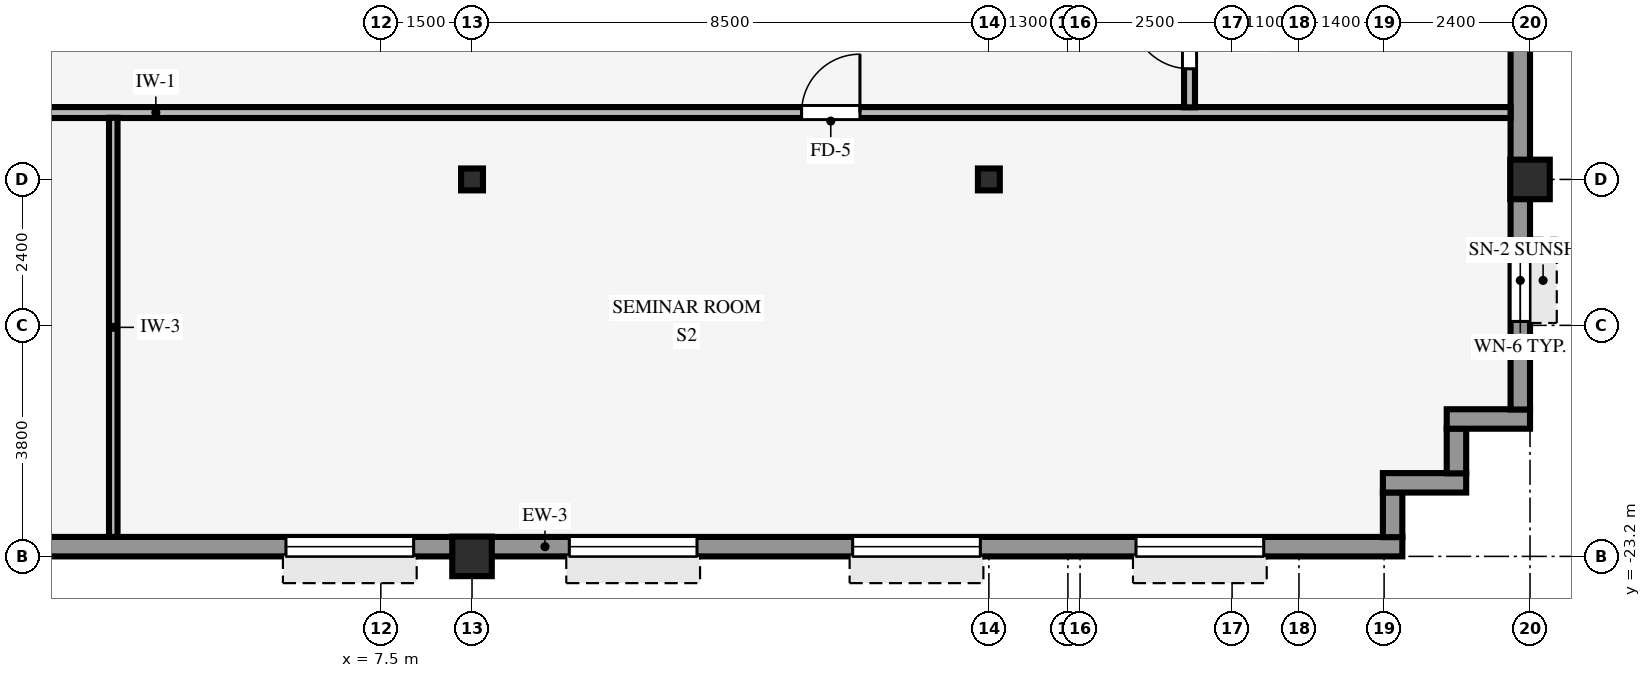
"""IFC4 building model, lengths in metres.
Left out: names, types, materials, properties, quantities, classifications, styles, units other than length and angle.
Written with IfcOpenShell. Run it as: python <this file> out.ifc"""

import sys

from ifc_helpers import new_model, si_unit, direction, frame, frame_2d, origin, origin_2d, place, context, subcontext, project, spatial, rectangle, hollow_rectangle, i_section, extrude, source, transform, mapped, element, fill, save


model = new_model("IFC4")
c1 = context("Model", 3, precision=1e-05, world=origin(), true_north=direction((0.0, 1.0)))
c2 = subcontext(c1, "Body", "Model", "MODEL_VIEW")
j1 = project(units=[si_unit("LENGTHUNIT", "METRE"), si_unit("PLANEANGLEUNIT", "RADIAN")], contexts=[c1])
p1 = place(None, origin())
s1 = spatial("IfcSite", under=j1, at=p1, CompositionType="ELEMENT")
p2 = place(p1, origin())
s2 = spatial("IfcBuilding", under=s1, at=p2, CompositionType="ELEMENT")
p3 = place(p2, frame((0.0, 0.0, 142.1)))
s3 = spatial("IfcBuildingStorey", under=s2, at=p3, CompositionType="ELEMENT", Elevation=142.1)
for number, where, z_axis, x_axis in (
    (1, (26.4, -17.0, 0.0), (0.0, 0.0, 1.0), (1.0, 0.0, 0.0)),
    (2, (9.0, -23.2, 0.0), (0.0, 0.0, 1.0), (1.0, 0.0, 0.0)),
):
    element("IfcColumn", number, at=place(p3, frame(where, z_axis=z_axis, x_axis=x_axis)), inside=s3, PredefinedType="COLUMN", context=c2, shape_type="SweptSolid", body=[
        extrude(hollow_rectangle(XDim=0.65, YDim=0.65, WallThickness=0.04, InnerFilletRadius=0.04, OuterFilletRadius=0.08, at=origin_2d()), origin(), (0.0, 0.0, 1.0), 3.37),
    ])
for number, where, z_axis, x_axis in (
    (3, (9.0, -17.0, 0.0), (0.0, 0.0, 1.0), (1.0, 0.0, 0.0)),
    (4, (17.5, -17.0, 0.0), (0.0, 0.0, 1.0), (1.0, 0.0, 0.0)),
):
    element("IfcColumn", number, at=place(p3, frame(where, z_axis=z_axis, x_axis=x_axis)), inside=s3, PredefinedType="COLUMN", context=c2, shape_type="SweptSolid", body=[
        extrude(i_section(OverallWidth=0.36, OverallDepth=0.36, WebThickness=0.021, FlangeThickness=0.021, FilletRadius=0.018, at=origin_2d()), origin(), (0.0, 0.0, 1.0), 3.37),
    ])
p4 = place(p3, frame((-24.3, -23.04, 0.0), z_axis=(0.0, 0.0, 1.0), x_axis=(1.0, 0.0, 0.0)))
e5 = element("IfcWall", 5, at=p4, inside=s3, PredefinedType="STANDARD", context=c2, shape_type="SweptSolid", body=[
    extrude(rectangle(XDim=48.6, YDim=0.32, at=frame_2d((24.3, 0.0))), origin(), (0.0, 0.0, 1.0), 2.705),
])
p5 = place(p4, frame((19.98, 0.0, 0.0), z_axis=(0.0, 0.0, 1.0), x_axis=(-1.0, 0.0, 0.0)))
e6 = element("IfcOpeningElement", 6, at=p5, cuts=e5, PredefinedType="OPENING", context=c2, shape_type="SweptSolid", body=[
    extrude(rectangle(XDim=0.98, YDim=2.15, at=frame_2d((0.49, 1.075))), frame((0.0, 0.17, 0.0), z_axis=(0.0, -1.0, 0.0), x_axis=(1.0, 0.0, 0.0)), (0.0, 0.0, 1.0), 0.34),
])
p6 = place(p4, frame((2.28, 0.0, 0.8)))
e7 = element("IfcOpeningElement", 7, at=p6, cuts=e5, PredefinedType="OPENING", context=c2, shape_type="SweptSolid", body=[
    extrude(rectangle(XDim=2.1, YDim=1.56, at=frame_2d((1.05, 0.78))), frame((0.0, 0.17, 0.0), z_axis=(0.0, -1.0, 0.0), x_axis=(1.0, 0.0, 0.0)), (0.0, 0.0, 1.0), 0.34),
])
p7 = place(p4, frame((6.94, 0.0, 0.8)))
e8 = element("IfcOpeningElement", 8, at=p7, cuts=e5, PredefinedType="OPENING", context=c2, shape_type="SweptSolid", body=[
    extrude(rectangle(XDim=2.1, YDim=1.56, at=frame_2d((1.05, 0.78))), frame((0.0, 0.17, 0.0), z_axis=(0.0, -1.0, 0.0), x_axis=(1.0, 0.0, 0.0)), (0.0, 0.0, 1.0), 0.34),
])
p8 = place(p4, frame((11.6, 0.0, 0.8)))
e9 = element("IfcOpeningElement", 9, at=p8, cuts=e5, PredefinedType="OPENING", context=c2, shape_type="SweptSolid", body=[
    extrude(rectangle(XDim=2.1, YDim=1.56, at=frame_2d((1.05, 0.78))), frame((0.0, 0.17, 0.0), z_axis=(0.0, -1.0, 0.0), x_axis=(1.0, 0.0, 0.0)), (0.0, 0.0, 1.0), 0.34),
])
p9 = place(p4, frame((16.26, 0.0, 0.8)))
e10 = element("IfcOpeningElement", 10, at=p9, cuts=e5, PredefinedType="OPENING", context=c2, shape_type="SweptSolid", body=[
    extrude(rectangle(XDim=2.1, YDim=1.56, at=frame_2d((1.05, 0.78))), frame((0.0, 0.17, 0.0), z_axis=(0.0, -1.0, 0.0), x_axis=(1.0, 0.0, 0.0)), (0.0, 0.0, 1.0), 0.34),
])
p10 = place(p4, frame((20.92, 0.0, 0.8)))
e11 = element("IfcOpeningElement", 11, at=p10, cuts=e5, PredefinedType="OPENING", context=c2, shape_type="SweptSolid", body=[
    extrude(rectangle(XDim=2.1, YDim=1.56, at=frame_2d((1.05, 0.78))), frame((0.0, 0.17, 0.0), z_axis=(0.0, -1.0, 0.0), x_axis=(1.0, 0.0, 0.0)), (0.0, 0.0, 1.0), 0.34),
])
p11 = place(p4, frame((30.24, 0.0, 0.8)))
e12 = element("IfcOpeningElement", 12, at=p11, cuts=e5, PredefinedType="OPENING", context=c2, shape_type="SweptSolid", body=[
    extrude(rectangle(XDim=2.1, YDim=1.56, at=frame_2d((1.05, 0.78))), frame((0.0, 0.17, 0.0), z_axis=(0.0, -1.0, 0.0), x_axis=(1.0, 0.0, 0.0)), (0.0, 0.0, 1.0), 0.34),
])
p12 = place(p4, frame((34.9, 0.0, 0.8)))
e13 = element("IfcOpeningElement", 13, at=p12, cuts=e5, PredefinedType="OPENING", context=c2, shape_type="SweptSolid", body=[
    extrude(rectangle(XDim=2.1, YDim=1.56, at=frame_2d((1.05, 0.78))), frame((0.0, 0.17, 0.0), z_axis=(0.0, -1.0, 0.0), x_axis=(1.0, 0.0, 0.0)), (0.0, 0.0, 1.0), 0.34),
])
p13 = place(p4, frame((39.56, 0.0, 0.8)))
e14 = element("IfcOpeningElement", 14, at=p13, cuts=e5, PredefinedType="OPENING", context=c2, shape_type="SweptSolid", body=[
    extrude(rectangle(XDim=2.1, YDim=1.56, at=frame_2d((1.05, 0.78))), frame((0.0, 0.17, 0.0), z_axis=(0.0, -1.0, 0.0), x_axis=(1.0, 0.0, 0.0)), (0.0, 0.0, 1.0), 0.34),
])
p14 = place(p4, frame((44.22, 0.0, 0.8)))
e15 = element("IfcOpeningElement", 15, at=p14, cuts=e5, PredefinedType="OPENING", context=c2, shape_type="SweptSolid", body=[
    extrude(rectangle(XDim=2.1, YDim=1.56, at=frame_2d((1.05, 0.78))), frame((0.0, 0.17, 0.0), z_axis=(0.0, -1.0, 0.0), x_axis=(1.0, 0.0, 0.0)), (0.0, 0.0, 1.0), 0.34),
])
p15 = place(p3, frame((24.14, -22.884, 0.0), z_axis=(0.0, 0.0, 1.0), x_axis=(0.0, 1.0, 0.0)))
e16 = element("IfcWall", 16, at=p15, inside=s3, PredefinedType="STANDARD", context=c2, shape_type="SweptSolid", body=[
    extrude(rectangle(XDim=0.738, YDim=0.32, at=frame_2d((0.369, 0.0))), origin(), (0.0, 0.0, 1.0), 3.36),
])
p16 = place(p3, frame((23.98, -21.99, 0.0), z_axis=(0.0, 0.0, 1.0), x_axis=(1.0, 0.0, 0.0)))
e17 = element("IfcWall", 17, at=p16, inside=s3, PredefinedType="STANDARD", context=c2, shape_type="SweptSolid", body=[
    extrude(rectangle(XDim=1.37, YDim=0.32, at=frame_2d((0.685, 0.0))), origin(), (0.0, 0.0, 1.0), 3.36),
])
p17 = place(p3, frame((25.19, -21.834, 0.0), z_axis=(0.0, 0.0, 1.0), x_axis=(0.0, 1.0, 0.0)))
e18 = element("IfcWall", 18, at=p17, inside=s3, PredefinedType="STANDARD", context=c2, shape_type="SweptSolid", body=[
    extrude(rectangle(XDim=0.738, YDim=0.32, at=frame_2d((0.369, 0.0))), origin(), (0.0, 0.0, 1.0), 3.36),
])
p18 = place(p3, frame((25.03, -20.94, 0.0), z_axis=(0.0, 0.0, 1.0), x_axis=(1.0, 0.0, 0.0)))
e19 = element("IfcWall", 19, at=p18, inside=s3, PredefinedType="STANDARD", context=c2, shape_type="SweptSolid", body=[
    extrude(rectangle(XDim=1.37, YDim=0.32, at=frame_2d((0.685, 0.0))), origin(), (0.0, 0.0, 1.0), 3.36),
])
p19 = place(p3, frame((26.24, -20.784, 0.0), z_axis=(0.0, 0.0, 1.0), x_axis=(0.0, 1.0, 0.0)))
e20 = element("IfcWall", 20, at=p19, inside=s3, PredefinedType="STANDARD", context=c2, shape_type="SweptSolid", body=[
    extrude(rectangle(XDim=41.568, YDim=0.32, at=frame_2d((20.784, 0.0))), origin(), (0.0, 0.0, 1.0), 2.705),
])
p20 = place(p19, frame((1.448, 0.0, 0.8)))
e21 = element("IfcOpeningElement", 21, at=p20, cuts=e20, PredefinedType="OPENING", context=c2, shape_type="SweptSolid", body=[
    extrude(rectangle(XDim=1.35, YDim=1.56, at=frame_2d((0.675, 0.78))), frame((0.0, 0.17, 0.0), z_axis=(0.0, -1.0, 0.0), x_axis=(1.0, 0.0, 0.0)), (0.0, 0.0, 1.0), 0.34),
])
p21 = place(p19, frame((7.744, 0.0, 0.8)))
e22 = element("IfcOpeningElement", 22, at=p21, cuts=e20, PredefinedType="OPENING", context=c2, shape_type="SweptSolid", body=[
    extrude(rectangle(XDim=1.35, YDim=1.56, at=frame_2d((0.675, 0.78))), frame((0.0, 0.17, 0.0), z_axis=(0.0, -1.0, 0.0), x_axis=(1.0, 0.0, 0.0)), (0.0, 0.0, 1.0), 0.34),
])
p22 = place(p19, frame((12.69, 0.0, 0.8)))
e23 = element("IfcOpeningElement", 23, at=p22, cuts=e20, PredefinedType="OPENING", context=c2, shape_type="SweptSolid", body=[
    extrude(rectangle(XDim=1.35, YDim=1.56, at=frame_2d((0.675, 0.78))), frame((0.0, 0.17, 0.0), z_axis=(0.0, -1.0, 0.0), x_axis=(1.0, 0.0, 0.0)), (0.0, 0.0, 1.0), 0.34),
])
p23 = place(p19, frame((17.636, 0.0, 0.8)))
e24 = element("IfcOpeningElement", 24, at=p23, cuts=e20, PredefinedType="OPENING", context=c2, shape_type="SweptSolid", body=[
    extrude(rectangle(XDim=1.35, YDim=1.56, at=frame_2d((0.675, 0.78))), frame((0.0, 0.17, 0.0), z_axis=(0.0, -1.0, 0.0), x_axis=(1.0, 0.0, 0.0)), (0.0, 0.0, 1.0), 0.34),
])
p24 = place(p19, frame((22.582, 0.0, 0.8)))
e25 = element("IfcOpeningElement", 25, at=p24, cuts=e20, PredefinedType="OPENING", context=c2, shape_type="SweptSolid", body=[
    extrude(rectangle(XDim=1.35, YDim=1.56, at=frame_2d((0.675, 0.78))), frame((0.0, 0.17, 0.0), z_axis=(0.0, -1.0, 0.0), x_axis=(1.0, 0.0, 0.0)), (0.0, 0.0, 1.0), 0.34),
])
p25 = place(p19, frame((27.528, 0.0, 0.8)))
e26 = element("IfcOpeningElement", 26, at=p25, cuts=e20, PredefinedType="OPENING", context=c2, shape_type="SweptSolid", body=[
    extrude(rectangle(XDim=1.35, YDim=1.56, at=frame_2d((0.675, 0.78))), frame((0.0, 0.17, 0.0), z_axis=(0.0, -1.0, 0.0), x_axis=(1.0, 0.0, 0.0)), (0.0, 0.0, 1.0), 0.34),
])
p26 = place(p19, frame((32.474, 0.0, 0.8)))
e27 = element("IfcOpeningElement", 27, at=p26, cuts=e20, PredefinedType="OPENING", context=c2, shape_type="SweptSolid", body=[
    extrude(rectangle(XDim=1.35, YDim=1.56, at=frame_2d((0.675, 0.78))), frame((0.0, 0.17, 0.0), z_axis=(0.0, -1.0, 0.0), x_axis=(1.0, 0.0, 0.0)), (0.0, 0.0, 1.0), 0.34),
])
p27 = place(p19, frame((38.77, 0.0, 0.8)))
e28 = element("IfcOpeningElement", 28, at=p27, cuts=e20, PredefinedType="OPENING", context=c2, shape_type="SweptSolid", body=[
    extrude(rectangle(XDim=1.35, YDim=1.56, at=frame_2d((0.675, 0.78))), frame((0.0, 0.17, 0.0), z_axis=(0.0, -1.0, 0.0), x_axis=(1.0, 0.0, 0.0)), (0.0, 0.0, 1.0), 0.34),
])
p28 = place(p3, frame((-26.08, -15.9, 0.0), z_axis=(0.0, 0.0, 1.0), x_axis=(1.0, 0.0, 0.0)))
e29 = element("IfcWall", 29, at=p28, inside=s3, PredefinedType="PARTITIONING", context=c2, shape_type="SweptSolid", body=[
    extrude(rectangle(XDim=52.16, YDim=0.18, at=frame_2d((26.08, 0.0))), origin(), (0.0, 0.0, 1.0), 3.36),
])
p29 = place(p28, frame((18.3, 0.0, 0.0)))
e30 = element("IfcOpeningElement", 30, at=p29, cuts=e29, PredefinedType="OPENING", context=c2, shape_type="SweptSolid", body=[
    extrude(rectangle(XDim=0.96, YDim=2.1, at=frame_2d((0.48, 1.05))), frame((0.0, 0.1, 0.0), z_axis=(0.0, -1.0, 0.0), x_axis=(1.0, 0.0, 0.0)), (0.0, 0.0, 1.0), 0.2),
])
p30 = place(p28, frame((40.5, 0.0, 0.0)))
e31 = element("IfcOpeningElement", 31, at=p30, cuts=e29, PredefinedType="OPENING", context=c2, shape_type="SweptSolid", body=[
    extrude(rectangle(XDim=0.96, YDim=2.1, at=frame_2d((0.48, 1.05))), frame((0.0, 0.1, 0.0), z_axis=(0.0, -1.0, 0.0), x_axis=(1.0, 0.0, 0.0)), (0.0, 0.0, 1.0), 0.2),
])
p31 = place(p3, frame((3.1, -22.88, 0.0), z_axis=(0.0, 0.0, 1.0), x_axis=(0.0, 1.0, 0.0)))
e32 = element("IfcWall", 32, at=p31, inside=s3, PredefinedType="PARTITIONING", context=c2, shape_type="SweptSolid", body=[
    extrude(rectangle(XDim=6.894, YDim=0.14, at=frame_2d((3.447, 0.0))), origin(), (0.0, 0.0, 1.0), 3.36),
])
p32 = place(p3, frame((20.8, -15.814, 0.0), z_axis=(0.0, 0.0, 1.0), x_axis=(0.0, 1.0, 0.0)))
e33 = element("IfcWall", 33, at=p32, inside=s3, PredefinedType="PARTITIONING", context=c2, shape_type="SweptSolid", body=[
    extrude(rectangle(XDim=2.228, YDim=0.18, at=frame_2d((1.114, 0.0))), origin(), (0.0, 0.0, 1.0), 3.36),
])
p33 = place(p32, frame((0.634, 0.0, 0.0)))
e34 = element("IfcOpeningElement", 34, at=p33, cuts=e33, PredefinedType="OPENING", context=c2, shape_type="SweptSolid", body=[
    extrude(rectangle(XDim=0.96, YDim=2.1, at=frame_2d((0.48, 1.05))), frame((0.0, 0.1, 0.0), z_axis=(0.0, -1.0, 0.0), x_axis=(1.0, 0.0, 0.0)), (0.0, 0.0, 1.0), 0.2),
])
m1 = source(origin(), c2, "Body", "SweptSolid", [
    extrude(rectangle(XDim=2.1, YDim=1.56, at=frame_2d((1.05, 0.78))), frame((0.0, 0.03, 0.0), z_axis=(0.0, -1.0, 0.0), x_axis=(1.0, 0.0, 0.0)), (0.0, 0.0, 1.0), 0.06),
])
p34 = place(p11, origin())
e35 = element("IfcWindow", 35, at=p34, inside=s3, PartitioningType="SINGLE_PANEL", PredefinedType="WINDOW", context=c2, shape_type="MappedRepresentation", body=[
    mapped(m1, transform((0.0, 0.0, 0.0), scale=1.0)),
])
fill(e12, e35)
p35 = place(p12, origin())
e36 = element("IfcWindow", 36, at=p35, inside=s3, PartitioningType="SINGLE_PANEL", PredefinedType="WINDOW", context=c2, shape_type="MappedRepresentation", body=[
    mapped(m1, transform((0.0, 0.0, 0.0), scale=1.0)),
])
fill(e13, e36)
p36 = place(p13, origin())
e37 = element("IfcWindow", 37, at=p36, inside=s3, PartitioningType="SINGLE_PANEL", PredefinedType="WINDOW", context=c2, shape_type="MappedRepresentation", body=[
    mapped(m1, transform((0.0, 0.0, 0.0), scale=1.0)),
])
fill(e14, e37)
p37 = place(p14, origin())
e38 = element("IfcWindow", 38, at=p37, inside=s3, PartitioningType="SINGLE_PANEL", PredefinedType="WINDOW", context=c2, shape_type="MappedRepresentation", body=[
    mapped(m1, transform((0.0, 0.0, 0.0), scale=1.0)),
])
fill(e15, e38)
m2 = source(origin(), c2, "Body", "SweptSolid", [
    extrude(rectangle(XDim=1.35, YDim=1.56, at=frame_2d((0.675, 0.78))), frame((0.0, 0.03, 0.0), z_axis=(0.0, -1.0, 0.0), x_axis=(1.0, 0.0, 0.0)), (0.0, 0.0, 1.0), 0.06),
])
p38 = place(p20, origin())
e39 = element("IfcWindow", 39, at=p38, inside=s3, PartitioningType="SINGLE_PANEL", PredefinedType="WINDOW", context=c2, shape_type="MappedRepresentation", body=[
    mapped(m2, transform((0.0, 0.0, 0.0), scale=1.0)),
])
fill(e21, e39)
m3 = source(origin(), c2, "Body", "SweptSolid", [
    extrude(rectangle(XDim=0.96, YDim=2.1, at=frame_2d((0.48, 1.05))), frame((0.0, 0.025, 0.0), z_axis=(0.0, -1.0, 0.0), x_axis=(1.0, 0.0, 0.0)), (0.0, 0.0, 1.0), 0.05),
])
p39 = place(p30, origin())
e40 = element("IfcDoor", 40, at=p39, inside=s3, OperationType="SINGLE_SWING_RIGHT", PredefinedType="DOOR", context=c2, shape_type="MappedRepresentation", body=[
    mapped(m3, transform((0.0, 0.0, 0.0), scale=1.0)),
])
fill(e31, e40)
p40 = place(p33, origin())
e41 = element("IfcDoor", 41, at=p40, inside=s3, OperationType="SINGLE_SWING_RIGHT", PredefinedType="DOOR", context=c2, shape_type="MappedRepresentation", body=[
    mapped(m3, transform((0.0, 0.0, 0.0), scale=1.0)),
])
fill(e34, e41)
save(model, sys.argv[1])
